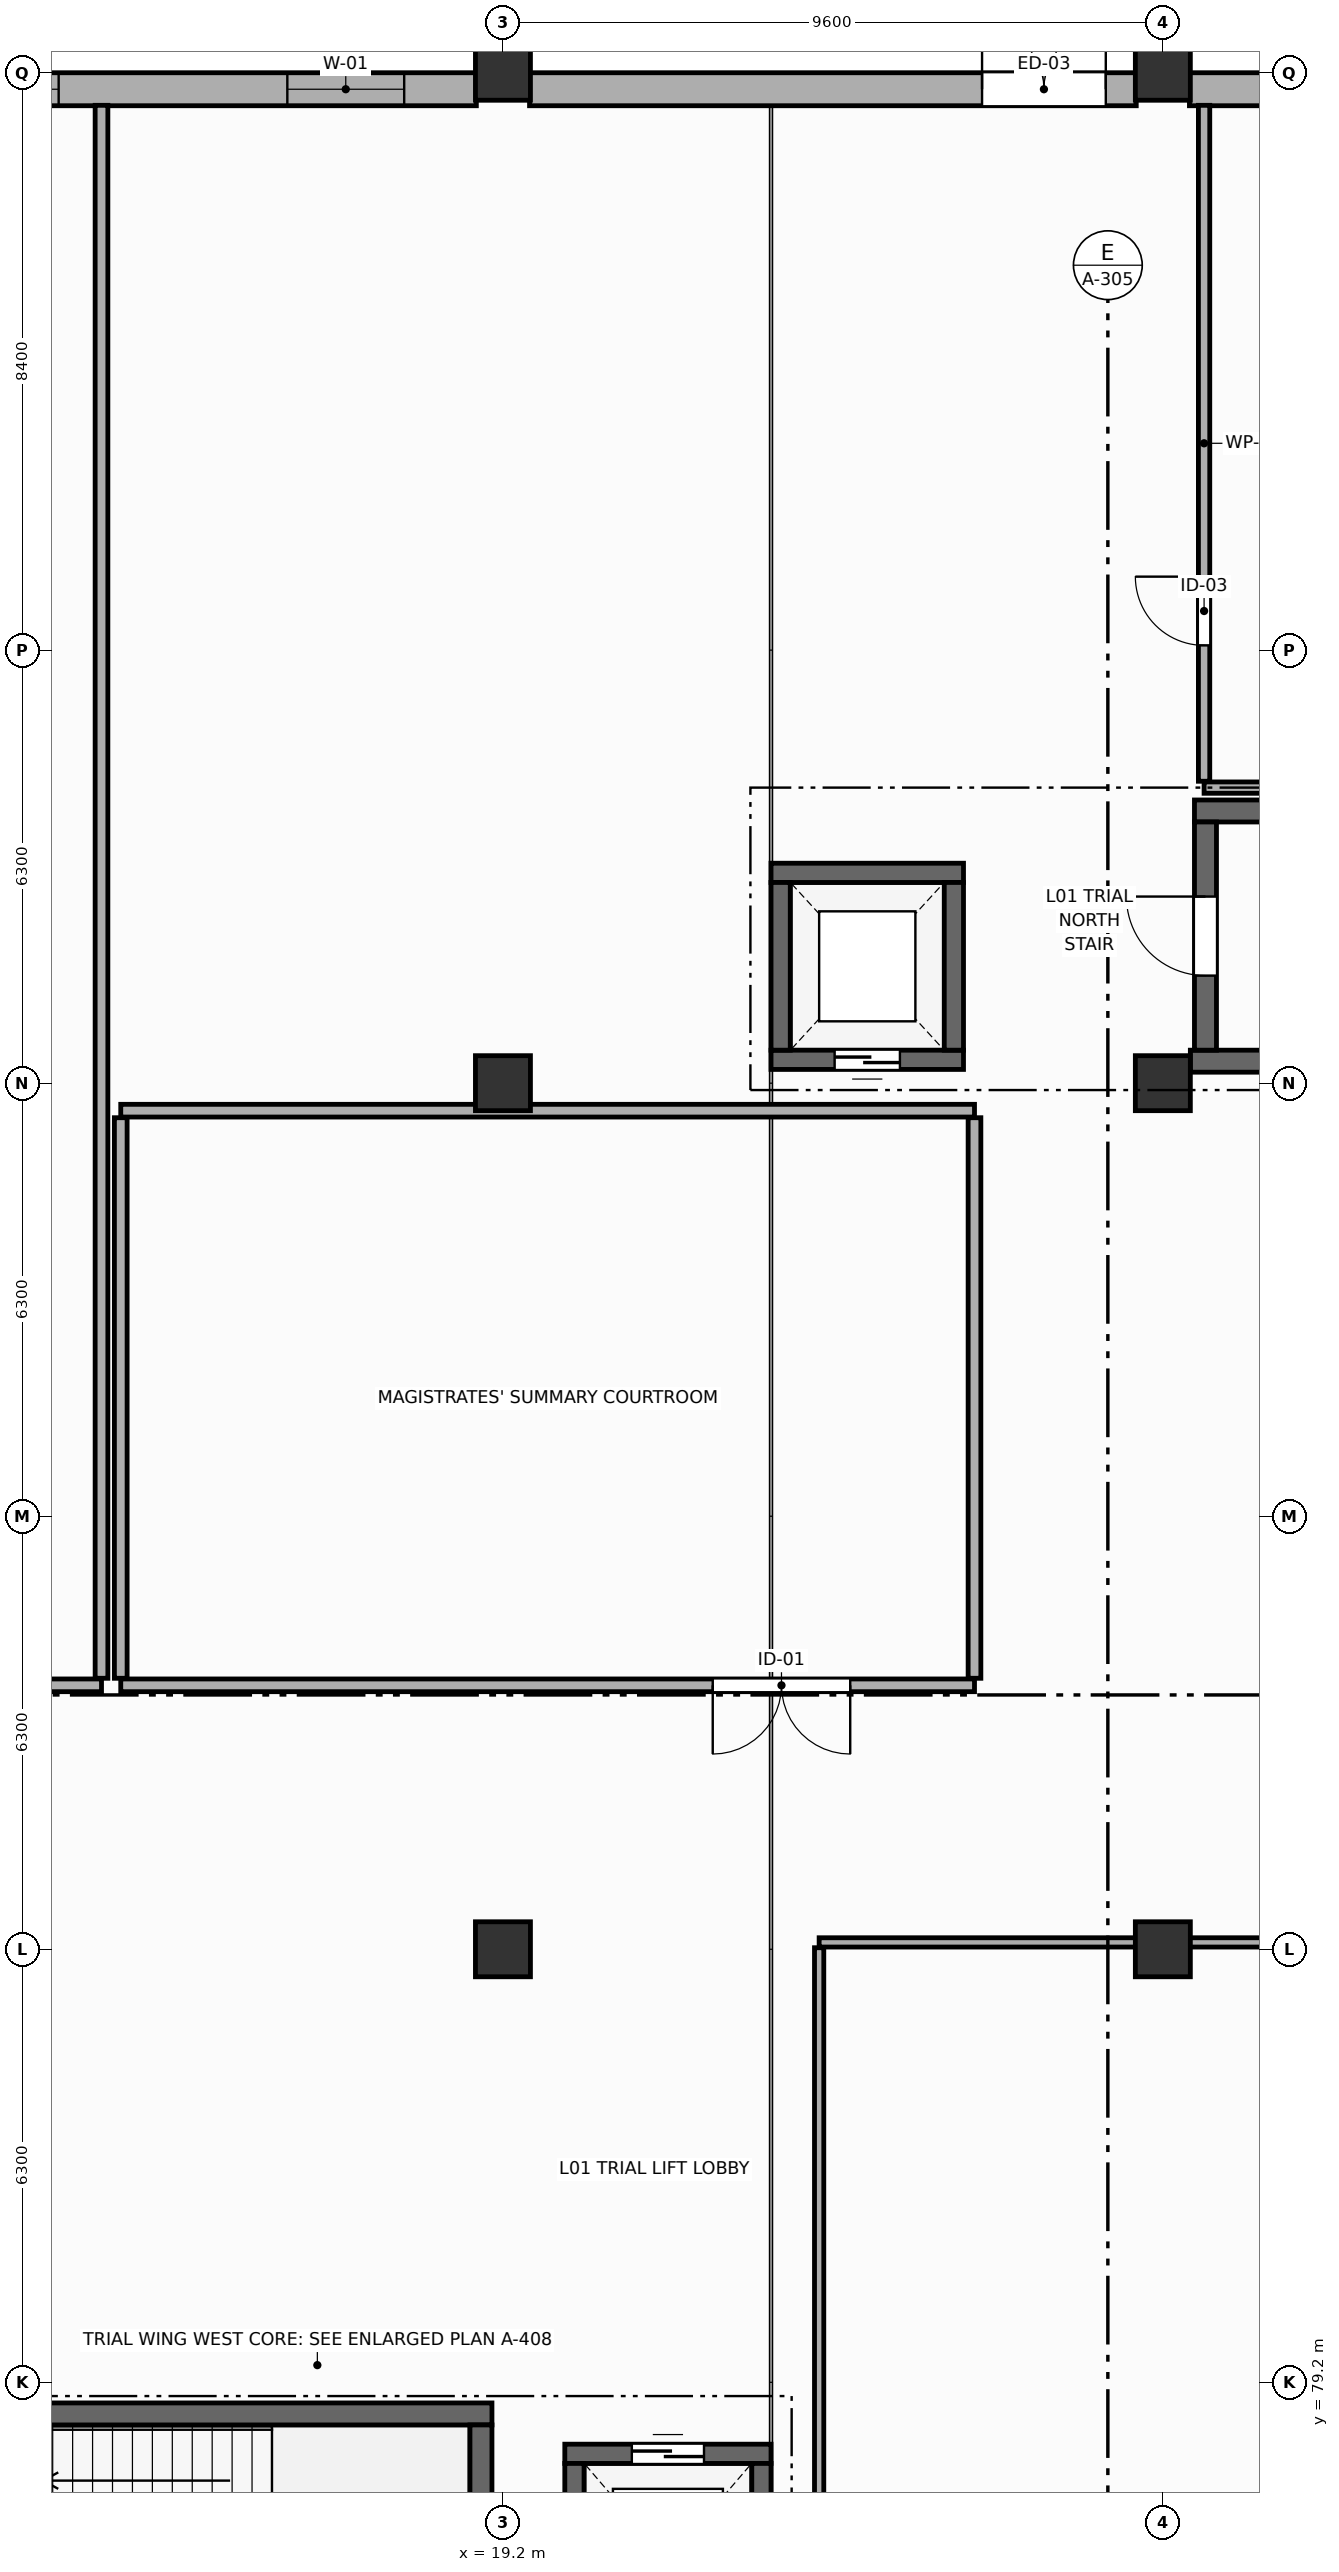
"""IFC4 building model, lengths in metres.
Left out: names, types, materials, properties, quantities, classifications, styles, units other than length and angle.
Written with IfcOpenShell. Run it as: python <this file> out.ifc"""

import sys

from ifc_helpers import new_model, si_unit, direction, frame, frame_2d, origin, origin_2d, place, context, subcontext, project, spatial, rectangle, extrude, element, fill, save


model = new_model("IFC4")
c1 = context("Model", 3, precision=1e-05, world=origin(), true_north=direction((0.0, 1.0)))
c2 = subcontext(c1, "Body", "Model", "MODEL_VIEW")
j1 = project(units=[si_unit("LENGTHUNIT", "METRE"), si_unit("PLANEANGLEUNIT", "RADIAN")], contexts=[c1])
p1 = place(None, origin())
s1 = spatial("IfcSite", under=j1, at=p1, CompositionType="ELEMENT")
p2 = place(p1, origin())
s2 = spatial("IfcBuilding", under=s1, at=p2, CompositionType="ELEMENT")
p3 = place(p2, origin())
s3 = spatial("IfcBuildingStorey", under=s2, at=p3, CompositionType="ELEMENT", Elevation=0.0)
for number, where, z_axis, x_axis in (
    (1, (19.2, 85.5, 0.0), (0.0, 0.0, 1.0), (1.0, 0.0, 0.0)),
    (2, (19.2, 98.1, 0.0), (0.0, 0.0, 1.0), (1.0, 0.0, 0.0)),
    (3, (19.2, 112.8, 0.0), (0.0, 0.0, 1.0), (1.0, 0.0, 0.0)),
    (4, (28.8, 85.5, 0.0), (0.0, 0.0, 1.0), (1.0, 0.0, 0.0)),
    (5, (28.8, 98.1, 0.0), (0.0, 0.0, 1.0), (1.0, 0.0, 0.0)),
    (6, (28.8, 112.8, 0.0), (0.0, 0.0, 1.0), (1.0, 0.0, 0.0)),
):
    element("IfcColumn", number, at=place(p3, frame(where, z_axis=z_axis, x_axis=x_axis)), inside=s3, PredefinedType="COLUMN", context=c2, shape_type="SweptSolid", body=[
        extrude(rectangle(XDim=0.8, YDim=0.8, at=origin_2d()), origin(), (0.0, 0.0, 1.0), 5.4),
    ])
p4 = place(p3, frame((9.992, 112.56, 0.0), z_axis=(0.0, 0.0, 1.0), x_axis=(1.0, 0.0, 0.0)))
e7 = element("IfcWall", 7, at=p4, inside=s3, PredefinedType="STANDARD", context=c2, shape_type="SweptSolid", body=[
    extrude(rectangle(XDim=8.821, YDim=0.48, at=frame_2d((4.411, 0.0))), origin(), (0.0, 0.0, 1.0), 4.18),
])
p5 = place(p4, frame((1.045, 0.0, 0.85)))
e8 = element("IfcOpeningElement", 8, at=p5, cuts=e7, PredefinedType="OPENING", context=c2, shape_type="SweptSolid", body=[
    extrude(rectangle(XDim=1.7, YDim=2.3, at=frame_2d((0.85, 1.15))), frame((0.0, 0.25, 0.0), z_axis=(0.0, -1.0, 0.0), x_axis=(1.0, 0.0, 0.0)), (0.0, 0.0, 1.0), 0.5),
])
p6 = place(p4, frame((6.071, 0.0, 0.85)))
e9 = element("IfcOpeningElement", 9, at=p6, cuts=e7, PredefinedType="OPENING", context=c2, shape_type="SweptSolid", body=[
    extrude(rectangle(XDim=1.7, YDim=2.3, at=frame_2d((0.85, 1.15))), frame((0.0, 0.25, 0.0), z_axis=(0.0, -1.0, 0.0), x_axis=(1.0, 0.0, 0.0)), (0.0, 0.0, 1.0), 0.5),
])
p7 = place(p3, frame((19.587, 112.56, 0.0), z_axis=(0.0, 0.0, 1.0), x_axis=(1.0, 0.0, 0.0)))
e10 = element("IfcWall", 10, at=p7, inside=s3, PredefinedType="STANDARD", context=c2, shape_type="SweptSolid", body=[
    extrude(rectangle(XDim=8.826, YDim=0.48, at=frame_2d((4.413, 0.0))), origin(), (0.0, 0.0, 1.0), 4.18),
])
p8 = place(p7, frame((6.583, 0.0, 0.0)))
e11 = element("IfcOpeningElement", 11, at=p8, cuts=e10, PredefinedType="OPENING", context=c2, shape_type="SweptSolid", body=[
    extrude(rectangle(XDim=1.8, YDim=2.25, at=frame_2d((0.9, 1.125))), frame((0.0, 0.25, 0.0), z_axis=(0.0, -1.0, 0.0), x_axis=(1.0, 0.0, 0.0)), (0.0, 0.0, 1.0), 0.5),
])
p9 = place(p3, frame((29.187, 112.56, 0.0), z_axis=(0.0, 0.0, 1.0), x_axis=(1.0, 0.0, 0.0)))
e12 = element("IfcWall", 12, at=p9, inside=s3, PredefinedType="STANDARD", context=c2, shape_type="SweptSolid", body=[
    extrude(rectangle(XDim=8.821, YDim=0.48, at=frame_2d((4.411, 0.0))), origin(), (0.0, 0.0, 1.0), 4.18),
])
p10 = place(p9, frame((1.05, 0.0, 0.85)))
e13 = element("IfcOpeningElement", 13, at=p10, cuts=e12, PredefinedType="OPENING", context=c2, shape_type="SweptSolid", body=[
    extrude(rectangle(XDim=1.7, YDim=2.3, at=frame_2d((0.85, 1.15))), frame((0.0, 0.25, 0.0), z_axis=(0.0, -1.0, 0.0), x_axis=(1.0, 0.0, 0.0)), (0.0, 0.0, 1.0), 0.5),
])
p11 = place(p9, frame((3.563, 0.0, 0.85)))
e14 = element("IfcOpeningElement", 14, at=p11, cuts=e12, PredefinedType="OPENING", context=c2, shape_type="SweptSolid", body=[
    extrude(rectangle(XDim=1.7, YDim=2.3, at=frame_2d((0.85, 1.15))), frame((0.0, 0.25, 0.0), z_axis=(0.0, -1.0, 0.0), x_axis=(1.0, 0.0, 0.0)), (0.0, 0.0, 1.0), 0.5),
])
p12 = place(p9, frame((6.076, 0.0, 0.85)))
e15 = element("IfcOpeningElement", 15, at=p12, cuts=e12, PredefinedType="OPENING", context=c2, shape_type="SweptSolid", body=[
    extrude(rectangle(XDim=1.7, YDim=2.3, at=frame_2d((0.85, 1.15))), frame((0.0, 0.25, 0.0), z_axis=(0.0, -1.0, 0.0), x_axis=(1.0, 0.0, 0.0)), (0.0, 0.0, 1.0), 0.5),
])
p13 = place(p3, frame((9.86, 78.74, 0.0), z_axis=(0.0, 0.0, 1.0), x_axis=(1.0, 0.0, 0.0)))
e16 = element("IfcWall", 16, at=p13, inside=s3, PredefinedType="SHEAR", context=c2, shape_type="SweptSolid", body=[
    extrude(rectangle(XDim=9.18, YDim=0.32, at=frame_2d((4.59, 0.0))), origin(), (0.0, 0.0, 1.0), 5.14),
])
p14 = place(p3, frame((18.88, 78.58, 0.0), z_axis=(0.0, 0.0, 1.0), x_axis=(0.0, -1.0, 0.0)))
e17 = element("IfcWall", 17, at=p14, inside=s3, PredefinedType="SHEAR", context=c2, shape_type="SweptSolid", body=[
    extrude(rectangle(XDim=3.4, YDim=0.32, at=frame_2d((1.7, 0.0))), origin(), (0.0, 0.0, 1.0), 5.14),
])
p15 = place(p3, frame((29.26, 102.06, 0.0), z_axis=(0.0, 0.0, 1.0), x_axis=(1.0, 0.0, 0.0)))
e18 = element("IfcWall", 18, at=p15, inside=s3, PredefinedType="SHEAR", context=c2, shape_type="SweptSolid", body=[
    extrude(rectangle(XDim=9.18, YDim=0.32, at=frame_2d((4.59, 0.0))), origin(), (0.0, 0.0, 1.0), 5.14),
])
p16 = place(p3, frame((38.44, 98.42, 0.0), z_axis=(0.0, 0.0, 1.0), x_axis=(-1.0, 0.0, 0.0)))
e19 = element("IfcWall", 19, at=p16, inside=s3, PredefinedType="SHEAR", context=c2, shape_type="SweptSolid", body=[
    extrude(rectangle(XDim=9.24, YDim=0.32, at=frame_2d((4.62, 0.0))), origin(), (0.0, 0.0, 1.0), 5.14),
])
p17 = place(p3, frame((29.42, 98.58, 0.0), z_axis=(0.0, 0.0, 1.0), x_axis=(0.0, 1.0, 0.0)))
e20 = element("IfcWall", 20, at=p17, inside=s3, PredefinedType="SHEAR", context=c2, shape_type="SweptSolid", body=[
    extrude(rectangle(XDim=3.32, YDim=0.32, at=frame_2d((1.66, 0.0))), origin(), (0.0, 0.0, 1.0), 5.14),
])
p18 = place(p17, frame((1.085, 0.0, 0.0)))
e21 = element("IfcOpeningElement", 21, at=p18, cuts=e20, PredefinedType="OPENING", context=c2, shape_type="SweptSolid", body=[
    extrude(rectangle(XDim=1.15, YDim=2.2, at=frame_2d((0.575, 1.1))), frame((0.0, 0.17, 0.0), z_axis=(0.0, -1.0, 0.0), x_axis=(1.0, 0.0, 0.0)), (0.0, 0.0, 1.0), 0.34),
])
p19 = place(p3, frame((20.1, 78.16, 0.0), z_axis=(0.0, 0.0, 1.0), x_axis=(1.0, 0.0, 0.0)))
e22 = element("IfcWall", 22, at=p19, inside=s3, PredefinedType="SHEAR", context=c2, shape_type="SweptSolid", body=[
    extrude(rectangle(XDim=3.0, YDim=0.28, at=frame_2d((1.5, 0.0))), origin(), (0.0, 0.0, 1.0), 5.14),
])
p20 = place(p19, frame((0.975, 0.0, 0.0)))
e23 = element("IfcOpeningElement", 23, at=p20, cuts=e22, PredefinedType="OPENING", context=c2, shape_type="SweptSolid", body=[
    extrude(rectangle(XDim=1.05, YDim=2.2, at=frame_2d((0.525, 1.1))), frame((0.0, 0.15, 0.0), z_axis=(0.0, -1.0, 0.0), x_axis=(1.0, 0.0, 0.0)), (0.0, 0.0, 1.0), 0.3),
])
for number, where, z_axis, x_axis in (
    (24, (20.24, 75.18, 0.0), (0.0, 0.0, 1.0), (0.0, 1.0, 0.0)),
    (25, (22.96, 78.02, 0.0), (0.0, 0.0, 1.0), (0.0, -1.0, 0.0)),
):
    element("IfcWall", number, at=place(p3, frame(where, z_axis=z_axis, x_axis=x_axis)), inside=s3, PredefinedType="SHEAR", context=c2, shape_type="SweptSolid", body=[
        extrude(rectangle(XDim=2.84, YDim=0.28, at=frame_2d((1.42, 0.0))), origin(), (0.0, 0.0, 1.0), 5.14),
    ])
p21 = place(p3, frame((23.1, 101.16, 0.0), z_axis=(0.0, 0.0, 1.0), x_axis=(1.0, 0.0, 0.0)))
e26 = element("IfcWall", 26, at=p21, inside=s3, PredefinedType="SHEAR", context=c2, shape_type="SweptSolid", body=[
    extrude(rectangle(XDim=2.8, YDim=0.28, at=frame_2d((1.4, 0.0))), origin(), (0.0, 0.0, 1.0), 5.14),
])
p22 = place(p3, frame((25.9, 98.44, 0.0), z_axis=(0.0, 0.0, 1.0), x_axis=(-1.0, 0.0, 0.0)))
e27 = element("IfcWall", 27, at=p22, inside=s3, PredefinedType="SHEAR", context=c2, shape_type="SweptSolid", body=[
    extrude(rectangle(XDim=2.8, YDim=0.28, at=frame_2d((1.4, 0.0))), origin(), (0.0, 0.0, 1.0), 5.14),
])
p23 = place(p22, frame((0.925, 0.0, 0.0)))
e28 = element("IfcOpeningElement", 28, at=p23, cuts=e27, PredefinedType="OPENING", context=c2, shape_type="SweptSolid", body=[
    extrude(rectangle(XDim=0.95, YDim=2.15, at=frame_2d((0.475, 1.075))), frame((0.0, 0.15, 0.0), z_axis=(0.0, -1.0, 0.0), x_axis=(1.0, 0.0, 0.0)), (0.0, 0.0, 1.0), 0.3),
])
for number, where, z_axis, x_axis in (
    (29, (23.24, 98.58, 0.0), (0.0, 0.0, 1.0), (0.0, 1.0, 0.0)),
    (30, (25.76, 101.02, 0.0), (0.0, 0.0, 1.0), (0.0, -1.0, 0.0)),
):
    element("IfcWall", number, at=place(p3, frame(where, z_axis=z_axis, x_axis=x_axis)), inside=s3, PredefinedType="SHEAR", context=c2, shape_type="SweptSolid", body=[
        extrude(rectangle(XDim=2.44, YDim=0.28, at=frame_2d((1.22, 0.0))), origin(), (0.0, 0.0, 1.0), 5.14),
    ])
p24 = place(p3, frame((13.36, 89.34, 0.0), z_axis=(0.0, 0.0, 1.0), x_axis=(-1.0, 0.0, 0.0)))
e31 = element("IfcWall", 31, at=p24, inside=s3, PredefinedType="PARTITIONING", context=c2, shape_type="SweptSolid", body=[
    extrude(rectangle(XDim=12.886, YDim=0.185, at=frame_2d((6.443, 0.0))), origin(), (0.0, 0.0, 1.0), 4.23),
])
p25 = place(p24, frame((1.878, 0.0, 0.0)))
e32 = element("IfcOpeningElement", 32, at=p25, cuts=e31, PredefinedType="OPENING", context=c2, shape_type="SweptSolid", body=[
    extrude(rectangle(XDim=2.0, YDim=2.5, at=frame_2d((1.0, 1.25))), frame((0.0, 0.103, 0.0), z_axis=(0.0, -1.0, 0.0), x_axis=(1.0, 0.0, 0.0)), (0.0, 0.0, 1.0), 0.205),
])
p26 = place(p3, frame((13.36, 112.326, 0.0), z_axis=(0.0, 0.0, 1.0), x_axis=(0.0, -1.0, 0.0)))
e33 = element("IfcWall", 33, at=p26, inside=s3, PredefinedType="PARTITIONING", context=c2, shape_type="SweptSolid", body=[
    extrude(rectangle(XDim=22.884, YDim=0.185, at=frame_2d((11.442, 0.0))), origin(), (0.0, 0.0, 1.0), 4.33),
])
p27 = place(p3, frame((13.64, 97.7, 0.0), z_axis=(0.0, 0.0, 1.0), x_axis=(1.0, 0.0, 0.0)))
e34 = element("IfcWall", 34, at=p27, inside=s3, PredefinedType="PARTITIONING", context=c2, shape_type="SweptSolid", body=[
    extrude(rectangle(XDim=12.42, YDim=0.185, at=frame_2d((6.21, 0.0))), origin(), (0.0, 0.0, 1.0), 4.18),
])
p28 = place(p3, frame((26.06, 89.34, 0.0), z_axis=(0.0, 0.0, 1.0), x_axis=(-1.0, 0.0, 0.0)))
e35 = element("IfcWall", 35, at=p28, inside=s3, PredefinedType="PARTITIONING", context=c2, shape_type="SweptSolid", body=[
    extrude(rectangle(XDim=12.42, YDim=0.185, at=frame_2d((6.21, 0.0))), origin(), (0.0, 0.0, 1.0), 4.23),
])
p29 = place(p28, frame((1.808, 0.0, 0.0)))
e36 = element("IfcOpeningElement", 36, at=p29, cuts=e35, PredefinedType="OPENING", context=c2, shape_type="SweptSolid", body=[
    extrude(rectangle(XDim=2.0, YDim=2.5, at=frame_2d((1.0, 1.25))), frame((0.0, 0.103, 0.0), z_axis=(0.0, -1.0, 0.0), x_axis=(1.0, 0.0, 0.0)), (0.0, 0.0, 1.0), 0.205),
])
for number, where, z_axis, x_axis in (
    (37, (13.64, 89.442, 0.0), (0.0, 0.0, 1.0), (0.0, 1.0, 0.0)),
    (38, (26.06, 97.597, 0.0), (0.0, 0.0, 1.0), (0.0, -1.0, 0.0)),
):
    element("IfcWall", number, at=place(p3, frame(where, z_axis=z_axis, x_axis=x_axis)), inside=s3, PredefinedType="PARTITIONING", context=c2, shape_type="SweptSolid", body=[
        extrude(rectangle(XDim=8.155, YDim=0.185, at=frame_2d((4.078, 0.0))), origin(), (0.0, 0.0, 1.0), 4.48),
    ])
p30 = place(p3, frame((45.6, 102.4, 0.0), z_axis=(0.0, 0.0, 1.0), x_axis=(-1.0, 0.0, 0.0)))
e39 = element("IfcWall", 39, at=p30, inside=s3, PredefinedType="PARTITIONING", context=c2, shape_type="SweptSolid", body=[
    extrude(rectangle(XDim=16.2, YDim=0.165, at=frame_2d((8.1, 0.0))), origin(), (0.0, 0.0, 1.0), 4.18),
])
p31 = place(p3, frame((29.4, 102.492, 0.0), z_axis=(0.0, 0.0, 1.0), x_axis=(0.0, 1.0, 0.0)))
e40 = element("IfcWall", 40, at=p31, inside=s3, PredefinedType="PARTITIONING", context=c2, shape_type="SweptSolid", body=[
    extrude(rectangle(XDim=9.833, YDim=0.165, at=frame_2d((4.917, 0.0))), origin(), (0.0, 0.0, 1.0), 4.48),
])
p32 = place(p31, frame((1.977, 0.0, 0.0)))
e41 = element("IfcOpeningElement", 41, at=p32, cuts=e40, PredefinedType="OPENING", context=c2, shape_type="SweptSolid", body=[
    extrude(rectangle(XDim=1.0, YDim=2.15, at=frame_2d((0.5, 1.075))), frame((0.0, 0.093, 0.0), z_axis=(0.0, -1.0, 0.0), x_axis=(1.0, 0.0, 0.0)), (0.0, 0.0, 1.0), 0.185),
])
p33 = place(p3, frame((23.8, 85.6, 0.0), z_axis=(0.0, 0.0, 1.0), x_axis=(1.0, 0.0, 0.0)))
e42 = element("IfcWall", 42, at=p33, inside=s3, PredefinedType="PARTITIONING", context=c2, shape_type="SweptSolid", body=[
    extrude(rectangle(XDim=21.8, YDim=0.135, at=frame_2d((10.9, 0.0))), origin(), (0.0, 0.0, 1.0), 4.23),
])
p34 = place(p33, frame((8.41, 0.0, 0.0)))
e43 = element("IfcOpeningElement", 43, at=p34, cuts=e42, PredefinedType="OPENING", context=c2, shape_type="SweptSolid", body=[
    extrude(rectangle(XDim=0.95, YDim=2.15, at=frame_2d((0.475, 1.075))), frame((0.0, 0.077, 0.0), z_axis=(0.0, -1.0, 0.0), x_axis=(1.0, 0.0, 0.0)), (0.0, 0.0, 1.0), 0.155),
])
p35 = place(p3, frame((23.8, 67.877, 0.0), z_axis=(0.0, 0.0, 1.0), x_axis=(0.0, 1.0, 0.0)))
e44 = element("IfcWall", 44, at=p35, inside=s3, PredefinedType="PARTITIONING", context=c2, shape_type="SweptSolid", body=[
    extrude(rectangle(XDim=17.645, YDim=0.135, at=frame_2d((8.823, 0.0))), origin(), (0.0, 0.0, 1.0), 4.33),
])
p36 = place(p5, origin())
e45 = element("IfcWindow", 45, at=p36, inside=s3, PartitioningType="SINGLE_PANEL", PredefinedType="WINDOW", context=c2, shape_type="SweptSolid", body=[
    extrude(rectangle(XDim=1.7, YDim=2.3, at=frame_2d((0.85, 1.15))), frame((0.0, 0.03, 0.0), z_axis=(0.0, -1.0, 0.0), x_axis=(1.0, 0.0, 0.0)), (0.0, 0.0, 1.0), 0.06),
])
fill(e8, e45)
p37 = place(p6, origin())
e46 = element("IfcWindow", 46, at=p37, inside=s3, PartitioningType="SINGLE_PANEL", PredefinedType="WINDOW", context=c2, shape_type="SweptSolid", body=[
    extrude(rectangle(XDim=1.7, YDim=2.3, at=frame_2d((0.85, 1.15))), frame((0.0, 0.03, 0.0), z_axis=(0.0, -1.0, 0.0), x_axis=(1.0, 0.0, 0.0)), (0.0, 0.0, 1.0), 0.06),
])
fill(e9, e46)
p38 = place(p8, origin())
e47 = element("IfcDoor", 47, at=p38, inside=s3, OperationType="DOUBLE_DOOR_SINGLE_SWING", PredefinedType="DOOR", context=c2, shape_type="SweptSolid", body=[
    extrude(rectangle(XDim=1.8, YDim=2.25, at=frame_2d((0.9, 1.125))), frame((0.0, 0.025, 0.0), z_axis=(0.0, -1.0, 0.0), x_axis=(1.0, 0.0, 0.0)), (0.0, 0.0, 1.0), 0.05),
])
fill(e11, e47)
p39 = place(p18, origin())
e48 = element("IfcDoor", 48, at=p39, inside=s3, OperationType="SINGLE_SWING_RIGHT", PredefinedType="DOOR", context=c2, shape_type="SweptSolid", body=[
    extrude(rectangle(XDim=1.15, YDim=2.2, at=frame_2d((0.575, 1.1))), frame((0.0, 0.025, 0.0), z_axis=(0.0, -1.0, 0.0), x_axis=(1.0, 0.0, 0.0)), (0.0, 0.0, 1.0), 0.05),
])
fill(e21, e48)
p40 = place(p20, origin())
e49 = element("IfcDoor", 49, at=p40, inside=s3, OperationType="DOUBLE_DOOR_SLIDING", PredefinedType="DOOR", context=c2, shape_type="SweptSolid", body=[
    extrude(rectangle(XDim=1.05, YDim=2.2, at=frame_2d((0.525, 1.1))), frame((0.0, 0.025, 0.0), z_axis=(0.0, -1.0, 0.0), x_axis=(1.0, 0.0, 0.0)), (0.0, 0.0, 1.0), 0.05),
])
fill(e23, e49)
p41 = place(p23, origin())
e50 = element("IfcDoor", 50, at=p41, inside=s3, OperationType="DOUBLE_DOOR_SLIDING", PredefinedType="DOOR", context=c2, shape_type="SweptSolid", body=[
    extrude(rectangle(XDim=0.95, YDim=2.15, at=frame_2d((0.475, 1.075))), frame((0.0, 0.025, 0.0), z_axis=(0.0, -1.0, 0.0), x_axis=(1.0, 0.0, 0.0)), (0.0, 0.0, 1.0), 0.05),
])
fill(e28, e50)
p42 = place(p29, origin())
e51 = element("IfcDoor", 51, at=p42, inside=s3, OperationType="DOUBLE_DOOR_SINGLE_SWING", PredefinedType="DOOR", context=c2, shape_type="SweptSolid", body=[
    extrude(rectangle(XDim=2.0, YDim=2.5, at=frame_2d((1.0, 1.25))), frame((0.0, 0.025, 0.0), z_axis=(0.0, -1.0, 0.0), x_axis=(1.0, 0.0, 0.0)), (0.0, 0.0, 1.0), 0.05),
])
fill(e36, e51)
p43 = place(p32, origin())
e52 = element("IfcDoor", 52, at=p43, inside=s3, OperationType="SINGLE_SWING_RIGHT", PredefinedType="DOOR", context=c2, shape_type="SweptSolid", body=[
    extrude(rectangle(XDim=1.0, YDim=2.15, at=frame_2d((0.5, 1.075))), frame((0.0, 0.025, 0.0), z_axis=(0.0, -1.0, 0.0), x_axis=(1.0, 0.0, 0.0)), (0.0, 0.0, 1.0), 0.05),
])
fill(e41, e52)
save(model, sys.argv[1])
